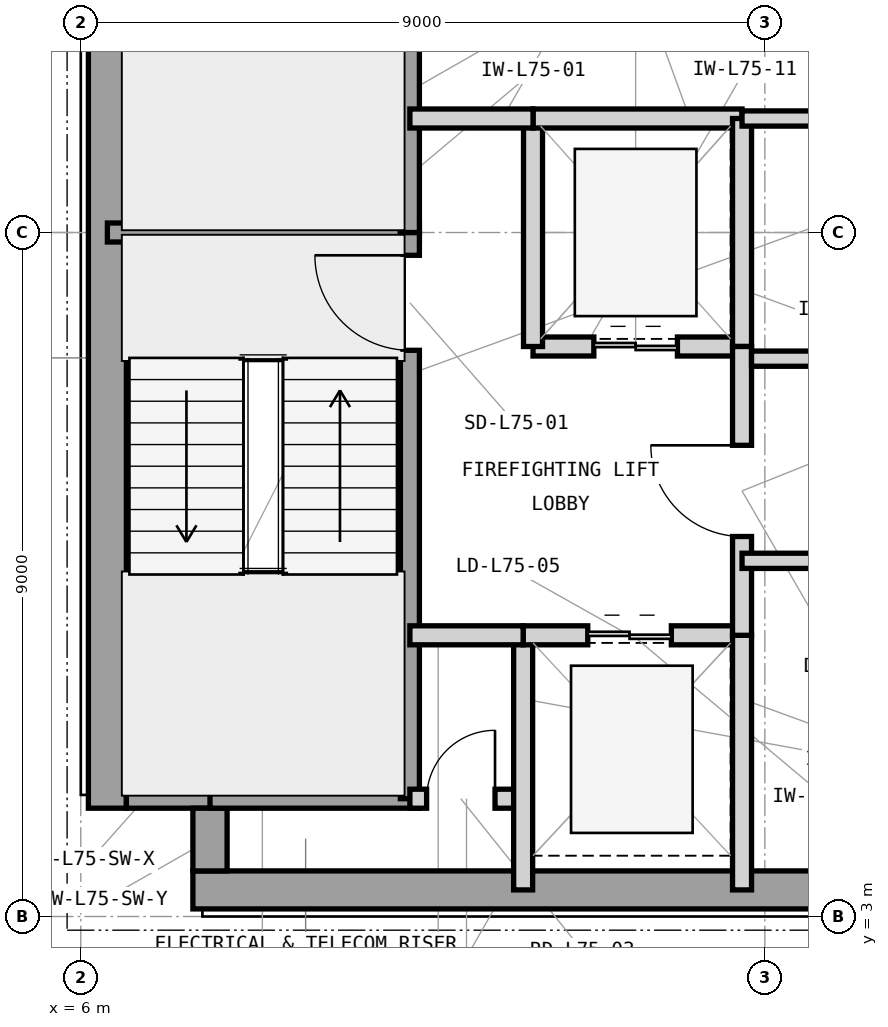
"""IFC4 building model, lengths in metres.
Left out: names, types, materials, properties, quantities, classifications, styles, units other than length and angle.
Written with IfcOpenShell. Run it as: python <this file> out.ifc"""

import sys

from ifc_helpers import new_model, si_unit, direction, frame, frame_2d, origin, place, context, subcontext, project, spatial, rectangle, extrude, element, fill, save


model = new_model("IFC4")
c1 = context("Model", 3, precision=1e-05, world=origin(), true_north=direction((0.0, 1.0)))
c2 = subcontext(c1, "Body", "Model", "MODEL_VIEW")
j1 = project(units=[si_unit("LENGTHUNIT", "METRE"), si_unit("PLANEANGLEUNIT", "RADIAN")], contexts=[c1])
p1 = place(None, origin())
s1 = spatial("IfcSite", under=j1, at=p1, CompositionType="ELEMENT")
p2 = place(p1, origin())
s2 = spatial("IfcBuilding", under=s1, at=p2, CompositionType="ELEMENT")
p3 = place(p2, frame((0.0, 0.0, 305.4)))
s3 = spatial("IfcBuildingStorey", under=s2, at=p3, CompositionType="ELEMENT", Elevation=305.4)
p4 = place(p3, frame((7.475, 3.35, 0.0), z_axis=(0.0, 0.0, 1.0), x_axis=(1.0, 0.0, 0.0)))
e1 = element("IfcWall", 1, at=p4, inside=s3, PredefinedType="SHEAR", context=c2, shape_type="SweptSolid", body=[
    extrude(rectangle(XDim=16.425, YDim=0.5, at=frame_2d((8.212, 0.0))), origin(), (0.0, 0.0, 1.0), 3.9),
])
p5 = place(p3, frame((6.35, 4.425, 0.0), z_axis=(0.0, 0.0, 1.0), x_axis=(0.0, 1.0, 0.0)))
e2 = element("IfcWall", 2, at=p5, inside=s3, PredefinedType="SHEAR", context=c2, shape_type="SweptSolid", body=[
    extrude(rectangle(XDim=15.15, YDim=0.5, at=frame_2d((7.575, 0.0))), origin(), (0.0, 0.0, 1.0), 3.9),
])
p6 = place(p3, frame((6.6, 4.65, 0.0), z_axis=(0.0, 0.0, 1.0), x_axis=(1.0, 0.0, 0.0)))
e3 = element("IfcWall", 3, at=p6, inside=s3, PredefinedType="SHEAR", context=c2, shape_type="SweptSolid", body=[
    extrude(rectangle(XDim=1.325, YDim=0.45, at=frame_2d((0.663, 0.0))), origin(), (0.0, 0.0, 1.0), 3.9),
])
p7 = place(p3, frame((7.7, 3.6, 0.0), z_axis=(0.0, 0.0, 1.0), x_axis=(0.0, 1.0, 0.0)))
e4 = element("IfcWall", 4, at=p7, inside=s3, PredefinedType="SHEAR", context=c2, shape_type="SweptSolid", body=[
    extrude(rectangle(XDim=0.825, YDim=0.45, at=frame_2d((0.413, 0.0))), origin(), (0.0, 0.0, 1.0), 3.9),
])
p8 = place(p3, frame((6.35, 12.0, 0.0), z_axis=(0.0, 0.0, 1.0), x_axis=(1.0, 0.0, 0.0)))
e5 = element("IfcWall", 5, at=p8, inside=s3, PredefinedType="SHEAR", context=c2, shape_type="SweptSolid", body=[
    extrude(rectangle(XDim=4.105, YDim=0.25, at=frame_2d((2.052, 0.0))), origin(), (0.0, 0.0, 1.0), 3.9),
])
p9 = place(p3, frame((7.7, 4.55, 0.0), z_axis=(0.0, 0.0, 1.0), x_axis=(1.0, 0.0, 0.0)))
e6 = element("IfcWall", 6, at=p9, inside=s3, PredefinedType="SHEAR", context=c2, shape_type="SweptSolid", body=[
    extrude(rectangle(XDim=2.755, YDim=0.25, at=frame_2d((1.377, 0.0))), origin(), (0.0, 0.0, 1.0), 3.9),
])
p10 = place(p3, frame((10.33, 4.55, 0.0), z_axis=(0.0, 0.0, 1.0), x_axis=(0.0, 1.0, 0.0)))
e7 = element("IfcWall", 7, at=p10, inside=s3, PredefinedType="SHEAR", context=c2, shape_type="SweptSolid", body=[
    extrude(rectangle(XDim=7.45, YDim=0.25, at=frame_2d((3.725, 0.0))), origin(), (0.0, 0.0, 1.0), 3.9),
])
p11 = place(p10, frame((5.9, 0.0, 0.0)))
e8 = element("IfcOpeningElement", 8, at=p11, cuts=e7, PredefinedType="OPENING", context=c2, shape_type="SweptSolid", body=[
    extrude(rectangle(XDim=1.25, YDim=2.2, at=frame_2d((0.625, 1.1))), frame((0.0, 0.135, 0.0), z_axis=(0.0, -1.0, 0.0), x_axis=(1.0, 0.0, 0.0)), (0.0, 0.0, 1.0), 0.27),
])
p12 = place(p3, frame((10.33, 12.0, 0.0), z_axis=(0.0, 0.0, 1.0), x_axis=(0.0, 1.0, 0.0)))
e9 = element("IfcWall", 9, at=p12, inside=s3, PredefinedType="SHEAR", context=c2, shape_type="SweptSolid", body=[
    extrude(rectangle(XDim=7.45, YDim=0.25, at=frame_2d((3.725, 0.0))), origin(), (0.0, 0.0, 1.0), 3.9),
])
p13 = place(p12, frame((5.85, 0.0, 0.0)))
e10 = element("IfcOpeningElement", 10, at=p13, cuts=e9, PredefinedType="OPENING", context=c2, shape_type="SweptSolid", body=[
    extrude(rectangle(XDim=1.25, YDim=2.2, at=frame_2d((0.625, 1.1))), frame((0.0, 0.135, 0.0), z_axis=(0.0, -1.0, 0.0), x_axis=(1.0, 0.0, 0.0)), (0.0, 0.0, 1.0), 0.27),
])
p14 = place(p3, frame((10.33, 4.55, 0.0), z_axis=(0.0, 0.0, 1.0), x_axis=(1.0, 0.0, 0.0)))
e11 = element("IfcWall", 11, at=p14, inside=s3, PredefinedType="PARTITIONING", context=c2, shape_type="SweptSolid", body=[
    extrude(rectangle(XDim=1.49, YDim=0.25, at=frame_2d((0.745, 0.0))), origin(), (0.0, 0.0, 1.0), 3.705),
])
p15 = place(p14, frame((0.22, 0.0, 0.0)))
e12 = element("IfcOpeningElement", 12, at=p15, cuts=e11, PredefinedType="OPENING", context=c2, shape_type="SweptSolid", body=[
    extrude(rectangle(XDim=0.9, YDim=2.1, at=frame_2d((0.45, 1.05))), frame((0.0, 0.135, 0.0), z_axis=(0.0, -1.0, 0.0), x_axis=(1.0, 0.0, 0.0)), (0.0, 0.0, 1.0), 0.27),
])
p16 = place(p3, frame((11.82, 3.35, 0.0), z_axis=(0.0, 0.0, 1.0), x_axis=(0.0, 1.0, 0.0)))
e13 = element("IfcWall", 13, at=p16, inside=s3, PredefinedType="PARTITIONING", context=c2, shape_type="SweptSolid", body=[
    extrude(rectangle(XDim=3.35, YDim=0.25, at=frame_2d((1.675, 0.0))), origin(), (0.0, 0.0, 1.0), 3.705),
])
p17 = place(p3, frame((11.82, 6.7, 0.0), z_axis=(0.0, 0.0, 1.0), x_axis=(1.0, 0.0, 0.0)))
e14 = element("IfcWall", 14, at=p17, inside=s3, PredefinedType="PARTITIONING", context=c2, shape_type="SweptSolid", body=[
    extrude(rectangle(XDim=2.88, YDim=0.25, at=frame_2d((1.44, 0.0))), origin(), (0.0, 0.0, 1.0), 3.354),
])
p18 = place(p17, frame((0.85, 0.0, 0.0)))
e15 = element("IfcOpeningElement", 15, at=p18, cuts=e14, PredefinedType="OPENING", context=c2, shape_type="SweptSolid", body=[
    extrude(rectangle(XDim=1.1, YDim=2.25, at=frame_2d((0.55, 1.125))), frame((0.0, 0.135, 0.0), z_axis=(0.0, -1.0, 0.0), x_axis=(1.0, 0.0, 0.0)), (0.0, 0.0, 1.0), 0.27),
])
p19 = place(p3, frame((14.7, 3.35, 0.0), z_axis=(0.0, 0.0, 1.0), x_axis=(0.0, 1.0, 0.0)))
e16 = element("IfcWall", 16, at=p19, inside=s3, PredefinedType="PARTITIONING", context=c2, shape_type="SweptSolid", body=[
    extrude(rectangle(XDim=3.35, YDim=0.25, at=frame_2d((1.675, 0.0))), origin(), (0.0, 0.0, 1.0), 3.705),
])
p20 = place(p3, frame((11.95, 10.5, 0.0), z_axis=(0.0, 0.0, 1.0), x_axis=(1.0, 0.0, 0.0)))
e17 = element("IfcWall", 17, at=p20, inside=s3, PredefinedType="PARTITIONING", context=c2, shape_type="SweptSolid", body=[
    extrude(rectangle(XDim=2.75, YDim=0.25, at=frame_2d((1.375, 0.0))), origin(), (0.0, 0.0, 1.0), 3.354),
])
p21 = place(p20, frame((0.8, 0.0, 0.0)))
e18 = element("IfcOpeningElement", 18, at=p21, cuts=e17, PredefinedType="OPENING", context=c2, shape_type="SweptSolid", body=[
    extrude(rectangle(XDim=1.1, YDim=2.25, at=frame_2d((0.55, 1.125))), frame((0.0, 0.135, 0.0), z_axis=(0.0, -1.0, 0.0), x_axis=(1.0, 0.0, 0.0)), (0.0, 0.0, 1.0), 0.27),
])
p22 = place(p3, frame((11.95, 10.5, 0.0), z_axis=(0.0, 0.0, 1.0), x_axis=(0.0, 1.0, 0.0)))
e19 = element("IfcWall", 19, at=p22, inside=s3, PredefinedType="PARTITIONING", context=c2, shape_type="SweptSolid", body=[
    extrude(rectangle(XDim=3.0, YDim=0.25, at=frame_2d((1.5, 0.0))), origin(), (0.0, 0.0, 1.0), 3.705),
])
p23 = place(p3, frame((11.95, 13.5, 0.0), z_axis=(0.0, 0.0, 1.0), x_axis=(1.0, 0.0, 0.0)))
e20 = element("IfcWall", 20, at=p23, inside=s3, PredefinedType="PARTITIONING", context=c2, shape_type="SweptSolid", body=[
    extrude(rectangle(XDim=2.75, YDim=0.25, at=frame_2d((1.375, 0.0))), origin(), (0.0, 0.0, 1.0), 3.354),
])
p24 = place(p3, frame((14.7, 10.5, 0.0), z_axis=(0.0, 0.0, 1.0), x_axis=(0.0, 1.0, 0.0)))
e21 = element("IfcWall", 21, at=p24, inside=s3, PredefinedType="PARTITIONING", context=c2, shape_type="SweptSolid", body=[
    extrude(rectangle(XDim=3.0, YDim=0.25, at=frame_2d((1.5, 0.0))), origin(), (0.0, 0.0, 1.0), 3.705),
])
p25 = place(p3, frame((14.7, 6.7, 0.0), z_axis=(0.0, 0.0, 1.0), x_axis=(0.0, 1.0, 0.0)))
e22 = element("IfcWall", 22, at=p25, inside=s3, PredefinedType="PARTITIONING", context=c2, shape_type="SweptSolid", body=[
    extrude(rectangle(XDim=3.8, YDim=0.25, at=frame_2d((1.9, 0.0))), origin(), (0.0, 0.0, 1.0), 3.705),
])
p26 = place(p25, frame((1.3, 0.0, 0.0)))
e23 = element("IfcOpeningElement", 23, at=p26, cuts=e22, PredefinedType="OPENING", context=c2, shape_type="SweptSolid", body=[
    extrude(rectangle(XDim=1.2, YDim=2.2, at=frame_2d((0.6, 1.1))), frame((0.0, 0.135, 0.0), z_axis=(0.0, -1.0, 0.0), x_axis=(1.0, 0.0, 0.0)), (0.0, 0.0, 1.0), 0.27),
])
p27 = place(p3, frame((10.33, 13.5, 0.0), z_axis=(0.0, 0.0, 1.0), x_axis=(1.0, 0.0, 0.0)))
e24 = element("IfcWall", 24, at=p27, inside=s3, PredefinedType="PARTITIONING", context=c2, shape_type="SweptSolid", body=[
    extrude(rectangle(XDim=1.62, YDim=0.25, at=frame_2d((0.81, 0.0))), origin(), (0.0, 0.0, 1.0), 3.354),
])
p28 = place(p3, frame((10.33, 6.7, 0.0), z_axis=(0.0, 0.0, 1.0), x_axis=(1.0, 0.0, 0.0)))
e25 = element("IfcWall", 25, at=p28, inside=s3, PredefinedType="PARTITIONING", context=c2, shape_type="SweptSolid", body=[
    extrude(rectangle(XDim=1.49, YDim=0.25, at=frame_2d((0.745, 0.0))), origin(), (0.0, 0.0, 1.0), 3.354),
])
p29 = place(p3, frame((14.7, 7.68, 0.0), z_axis=(0.0, 0.0, 1.0), x_axis=(1.0, 0.0, 0.0)))
e26 = element("IfcWall", 26, at=p29, inside=s3, PredefinedType="PARTITIONING", context=c2, shape_type="SweptSolid", body=[
    extrude(rectangle(XDim=2.85, YDim=0.2, at=frame_2d((1.425, 0.0))), origin(), (0.0, 0.0, 1.0), 3.705),
])
p30 = place(p29, frame((0.925, 0.0, 0.0)))
e27 = element("IfcOpeningElement", 27, at=p30, cuts=e26, PredefinedType="OPENING", context=c2, shape_type="SweptSolid", body=[
    extrude(rectangle(XDim=1.0, YDim=2.15, at=frame_2d((0.5, 1.075))), frame((0.0, 0.11, 0.0), z_axis=(0.0, -1.0, 0.0), x_axis=(1.0, 0.0, 0.0)), (0.0, 0.0, 1.0), 0.22),
])
p31 = place(p3, frame((14.825, 10.34, 0.0), z_axis=(0.0, 0.0, 1.0), x_axis=(1.0, 0.0, 0.0)))
e28 = element("IfcWall", 28, at=p31, inside=s3, PredefinedType="PARTITIONING", context=c2, shape_type="SweptSolid", body=[
    extrude(rectangle(XDim=4.88, YDim=0.2, at=frame_2d((2.44, 0.0))), origin(), (0.0, 0.0, 1.0), 3.705),
])
p32 = place(p3, frame((14.7, 13.5, 0.0), z_axis=(0.0, 0.0, 1.0), x_axis=(1.0, 0.0, 0.0)))
e29 = element("IfcWall", 29, at=p32, inside=s3, PredefinedType="PARTITIONING", context=c2, shape_type="SweptSolid", body=[
    extrude(rectangle(XDim=3.75, YDim=0.2, at=frame_2d((1.875, 0.0))), origin(), (0.0, 0.0, 1.0), 3.354),
])
p33 = place(p32, frame((1.4, 0.0, 0.0)))
e30 = element("IfcOpeningElement", 30, at=p33, cuts=e29, PredefinedType="OPENING", context=c2, shape_type="SweptSolid", body=[
    extrude(rectangle(XDim=0.95, YDim=2.1, at=frame_2d((0.475, 1.05))), frame((0.0, 0.11, 0.0), z_axis=(0.0, -1.0, 0.0), x_axis=(1.0, 0.0, 0.0)), (0.0, 0.0, 1.0), 0.22),
])
p34 = place(p11, origin())
e31 = element("IfcDoor", 31, at=p34, inside=s3, OperationType="SINGLE_SWING_RIGHT", PredefinedType="DOOR", context=c2, shape_type="SweptSolid", body=[
    extrude(rectangle(XDim=1.25, YDim=2.2, at=frame_2d((0.625, 1.1))), frame((0.0, 0.025, 0.0), z_axis=(0.0, -1.0, 0.0), x_axis=(1.0, 0.0, 0.0)), (0.0, 0.0, 1.0), 0.05),
])
fill(e8, e31)
p35 = place(p15, origin())
e32 = element("IfcDoor", 32, at=p35, inside=s3, OperationType="SINGLE_SWING_RIGHT", PredefinedType="TRAPDOOR", context=c2, shape_type="SweptSolid", body=[
    extrude(rectangle(XDim=0.9, YDim=2.1, at=frame_2d((0.45, 1.05))), frame((0.0, 0.025, 0.0), z_axis=(0.0, -1.0, 0.0), x_axis=(1.0, 0.0, 0.0)), (0.0, 0.0, 1.0), 0.05),
])
fill(e12, e32)
p36 = place(p18, origin())
e33 = element("IfcDoor", 33, at=p36, inside=s3, OperationType="DOUBLE_DOOR_SLIDING", PredefinedType="DOOR", context=c2, shape_type="SweptSolid", body=[
    extrude(rectangle(XDim=1.1, YDim=2.25, at=frame_2d((0.55, 1.125))), frame((0.0, 0.025, 0.0), z_axis=(0.0, -1.0, 0.0), x_axis=(1.0, 0.0, 0.0)), (0.0, 0.0, 1.0), 0.05),
])
fill(e15, e33)
p37 = place(p21, origin())
e34 = element("IfcDoor", 34, at=p37, inside=s3, OperationType="DOUBLE_DOOR_SLIDING", PredefinedType="DOOR", context=c2, shape_type="SweptSolid", body=[
    extrude(rectangle(XDim=1.1, YDim=2.25, at=frame_2d((0.55, 1.125))), frame((0.0, 0.025, 0.0), z_axis=(0.0, -1.0, 0.0), x_axis=(1.0, 0.0, 0.0)), (0.0, 0.0, 1.0), 0.05),
])
fill(e18, e34)
p38 = place(p26, origin())
e35 = element("IfcDoor", 35, at=p38, inside=s3, OperationType="SINGLE_SWING_RIGHT", PredefinedType="DOOR", context=c2, shape_type="SweptSolid", body=[
    extrude(rectangle(XDim=1.2, YDim=2.2, at=frame_2d((0.6, 1.1))), frame((0.0, 0.025, 0.0), z_axis=(0.0, -1.0, 0.0), x_axis=(1.0, 0.0, 0.0)), (0.0, 0.0, 1.0), 0.05),
])
fill(e23, e35)
save(model, sys.argv[1])
